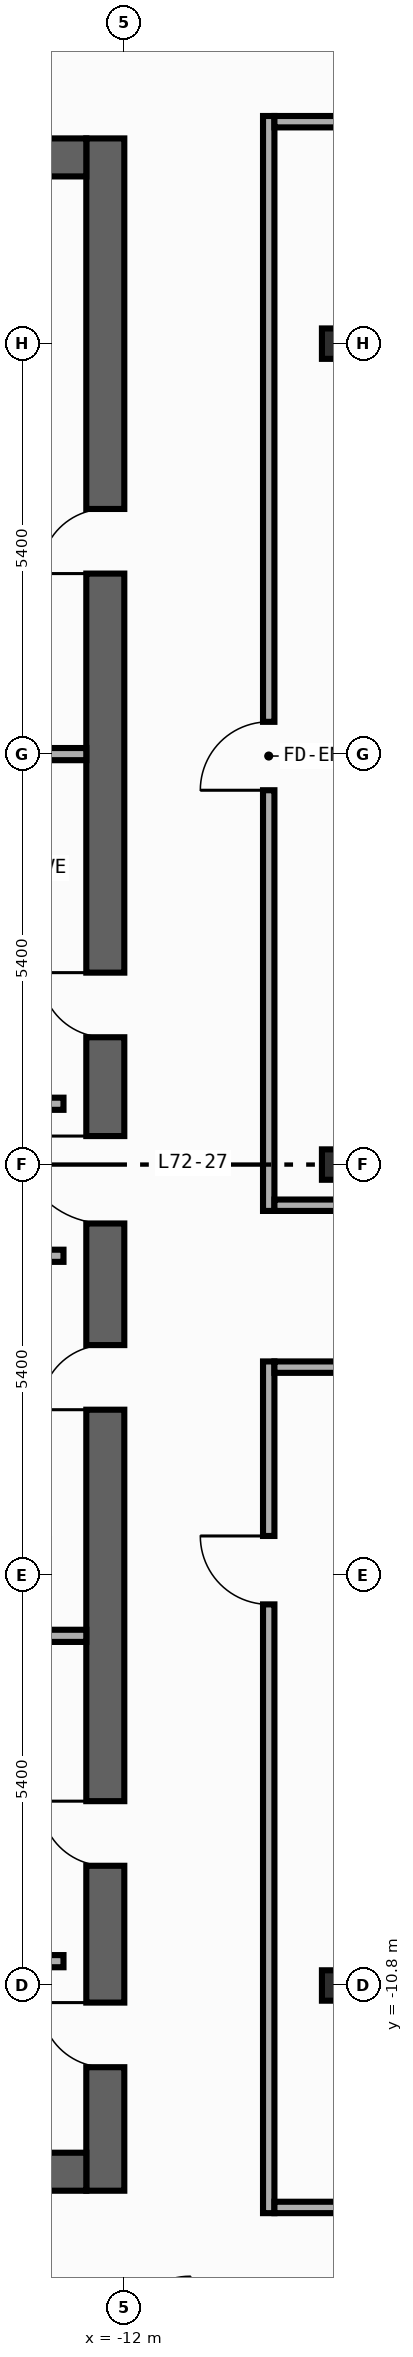
"""IFC4 building model, lengths in metres.
Left out: names, types, materials, properties, quantities, classifications, styles, units other than length and angle.
Written with IfcOpenShell. Run it as: python <this file> out.ifc"""

import sys

from ifc_helpers import new_model, si_unit, direction, frame, frame_2d, origin, origin_2d, place, context, subcontext, project, spatial, rectangle, i_section, extrude, element, fill, save


model = new_model("IFC4")
c1 = context("Model", 3, precision=1e-05, world=origin(), true_north=direction((0.0, 1.0)))
c2 = subcontext(c1, "Body", "Model", "MODEL_VIEW")
j1 = project(units=[si_unit("LENGTHUNIT", "METRE"), si_unit("PLANEANGLEUNIT", "RADIAN")], contexts=[c1])
p1 = place(None, origin())
s1 = spatial("IfcSite", under=j1, at=p1, CompositionType="ELEMENT")
p2 = place(p1, origin())
s2 = spatial("IfcBuilding", under=s1, at=p2, CompositionType="ELEMENT")
p3 = place(p2, frame((0.0, 0.0, 300.4)))
s3 = spatial("IfcBuildingStorey", under=s2, at=p3, CompositionType="ELEMENT", Elevation=300.4)
p4 = place(p3, frame((-12.25, -13.5, 0.0), z_axis=(0.0, 0.0, 1.0), x_axis=(0.0, 1.0, 0.0)))
e1 = element("IfcWall", 1, at=p4, inside=s3, PredefinedType="SHEAR", context=c2, shape_type="SweptSolid", body=[
    extrude(rectangle(XDim=27.0, YDim=0.5, at=frame_2d((13.5, 0.0))), origin(), (0.0, 0.0, 1.0), 3.54),
])
p5 = place(p4, frame((15.175, 0.0, 0.0)))
e2 = element("IfcOpeningElement", 2, at=p5, cuts=e1, PredefinedType="OPENING", context=c2, shape_type="SweptSolid", body=[
    extrude(rectangle(XDim=0.85, YDim=2.1, at=frame_2d((0.425, 1.05))), frame((0.0, 0.26, 0.0), z_axis=(0.0, -1.0, 0.0), x_axis=(1.0, 0.0, 0.0)), (0.0, 0.0, 1.0), 0.52),
])
p6 = place(p4, frame((21.275, 0.0, 0.0)))
e3 = element("IfcOpeningElement", 3, at=p6, cuts=e1, PredefinedType="OPENING", context=c2, shape_type="SweptSolid", body=[
    extrude(rectangle(XDim=0.85, YDim=2.1, at=frame_2d((0.425, 1.05))), frame((0.0, 0.26, 0.0), z_axis=(0.0, -1.0, 0.0), x_axis=(1.0, 0.0, 0.0)), (0.0, 0.0, 1.0), 0.52),
])
p7 = place(p4, frame((4.275, 0.0, 0.0)))
e4 = element("IfcOpeningElement", 4, at=p7, cuts=e1, PredefinedType="OPENING", context=c2, shape_type="SweptSolid", body=[
    extrude(rectangle(XDim=0.85, YDim=2.1, at=frame_2d((0.425, 1.05))), frame((0.0, 0.26, 0.0), z_axis=(0.0, -1.0, 0.0), x_axis=(1.0, 0.0, 0.0)), (0.0, 0.0, 1.0), 0.52),
])
p8 = place(p4, frame((10.275, 0.0, 0.0)))
e5 = element("IfcOpeningElement", 5, at=p8, cuts=e1, PredefinedType="OPENING", context=c2, shape_type="SweptSolid", body=[
    extrude(rectangle(XDim=0.85, YDim=2.1, at=frame_2d((0.425, 1.05))), frame((0.0, 0.26, 0.0), z_axis=(0.0, -1.0, 0.0), x_axis=(1.0, 0.0, 0.0)), (0.0, 0.0, 1.0), 0.52),
])
p9 = place(p4, frame((12.725, 0.0, 0.0)))
e6 = element("IfcOpeningElement", 6, at=p9, cuts=e1, PredefinedType="OPENING", context=c2, shape_type="SweptSolid", body=[
    extrude(rectangle(XDim=1.15, YDim=2.2, at=frame_2d((0.575, 1.1))), frame((0.0, 0.26, 0.0), z_axis=(0.0, -1.0, 0.0), x_axis=(1.0, 0.0, 0.0)), (0.0, 0.0, 1.0), 0.52),
])
p10 = place(p4, frame((1.625, 0.0, 0.0)))
e7 = element("IfcOpeningElement", 7, at=p10, cuts=e1, PredefinedType="OPENING", context=c2, shape_type="SweptSolid", body=[
    extrude(rectangle(XDim=0.85, YDim=2.1, at=frame_2d((0.425, 1.05))), frame((0.0, 0.26, 0.0), z_axis=(0.0, -1.0, 0.0), x_axis=(1.0, 0.0, 0.0)), (0.0, 0.0, 1.0), 0.52),
])
for number, where, z_axis, x_axis in (
    (8, (-19.9, -13.25, 0.0), (0.0, 0.0, 1.0), (1.0, 0.0, 0.0)),
    (9, (-19.9, 13.25, 0.0), (0.0, 0.0, 1.0), (1.0, 0.0, 0.0)),
):
    element("IfcWall", number, at=place(p3, frame(where, z_axis=z_axis, x_axis=x_axis)), inside=s3, PredefinedType="SHEAR", context=c2, shape_type="SweptSolid", body=[
        extrude(rectangle(XDim=7.4, YDim=0.5, at=frame_2d((3.7, 0.0))), origin(), (0.0, 0.0, 1.0), 3.54),
    ])
for number, where, z_axis, x_axis in (
    (10, (-9.2, -10.8, 0.0), (0.0, 0.0, 1.0), (1.0, 0.0, 0.0)),
    (11, (-9.2, 0.0, 0.0), (0.0, 0.0, 1.0), (1.0, 0.0, 0.0)),
    (12, (-9.2, 10.8, 0.0), (0.0, 0.0, 1.0), (1.0, 0.0, 0.0)),
):
    element("IfcColumn", number, at=place(p3, frame(where, z_axis=z_axis, x_axis=x_axis)), inside=s3, PredefinedType="COLUMN", context=c2, shape_type="SweptSolid", body=[
        extrude(i_section(OverallWidth=0.4, OverallDepth=0.4, WebThickness=0.013, FlangeThickness=0.021, FilletRadius=0.022, at=origin_2d()), origin(), (0.0, 0.0, 1.0), 3.8),
    ])
for number, where, z_axis, x_axis in (
    (13, (-15.4, 0.8, 0.0), (0.0, 0.0, 1.0), (1.0, 0.0, 0.0)),
    (14, (-15.4, -1.2, 0.0), (0.0, 0.0, 1.0), (1.0, 0.0, 0.0)),
    (15, (-15.4, -10.48, 0.0), (0.0, 0.0, 1.0), (1.0, 0.0, 0.0)),
):
    element("IfcWall", number, at=place(p3, frame(where, z_axis=z_axis, x_axis=x_axis)), inside=s3, PredefinedType="STANDARD", context=c2, shape_type="SweptSolid", body=[
        extrude(rectangle(XDim=2.6, YDim=0.16, at=frame_2d((1.3, 0.0))), origin(), (0.0, 0.0, 1.0), 3.54),
    ])
for number, where, z_axis, x_axis in (
    (16, (-15.4, 5.4, 0.0), (0.0, 0.0, 1.0), (1.0, 0.0, 0.0)),
    (17, (-15.4, -6.2, 0.0), (0.0, 0.0, 1.0), (1.0, 0.0, 0.0)),
):
    element("IfcWall", number, at=place(p3, frame(where, z_axis=z_axis, x_axis=x_axis)), inside=s3, PredefinedType="PARTITIONING", context=c2, shape_type="SweptSolid", body=[
        extrude(rectangle(XDim=2.9, YDim=0.16, at=frame_2d((1.45, 0.0))), origin(), (0.0, 0.0, 1.0), 3.54),
    ])
p11 = place(p3, frame((-10.1, -0.61, 0.0), z_axis=(0.0, 0.0, 1.0), x_axis=(0.0, 1.0, 0.0)))
e18 = element("IfcWall", 18, at=p11, inside=s3, PredefinedType="PARTITIONING", context=c2, shape_type="SweptSolid", body=[
    extrude(rectangle(XDim=14.405, YDim=0.15, at=frame_2d((7.203, 0.0))), origin(), (0.0, 0.0, 1.0), 3.54),
])
p12 = place(p11, frame((5.535, 0.0, 0.0)))
e19 = element("IfcOpeningElement", 19, at=p12, cuts=e18, PredefinedType="OPENING", context=c2, shape_type="SweptSolid", body=[
    extrude(rectangle(XDim=0.9, YDim=2.15, at=frame_2d((0.45, 1.075))), frame((0.0, 0.085, 0.0), z_axis=(0.0, -1.0, 0.0), x_axis=(1.0, 0.0, 0.0)), (0.0, 0.0, 1.0), 0.17),
])
p13 = place(p3, frame((-10.1, -13.795, 0.0), z_axis=(0.0, 0.0, 1.0), x_axis=(0.0, 1.0, 0.0)))
e20 = element("IfcWall", 20, at=p13, inside=s3, PredefinedType="PARTITIONING", context=c2, shape_type="SweptSolid", body=[
    extrude(rectangle(XDim=11.205, YDim=0.15, at=frame_2d((5.603, 0.0))), origin(), (0.0, 0.0, 1.0), 3.54),
])
p14 = place(p13, frame((8.009, 0.0, 0.0)))
e21 = element("IfcOpeningElement", 21, at=p14, cuts=e20, PredefinedType="OPENING", context=c2, shape_type="SweptSolid", body=[
    extrude(rectangle(XDim=0.9, YDim=2.15, at=frame_2d((0.45, 1.075))), frame((0.0, 0.085, 0.0), z_axis=(0.0, -1.0, 0.0), x_axis=(1.0, 0.0, 0.0)), (0.0, 0.0, 1.0), 0.17),
])
p15 = place(p3, frame((-10.025, -0.535, 0.0), z_axis=(0.0, 0.0, 1.0), x_axis=(1.0, 0.0, 0.0)))
e22 = element("IfcWall", 22, at=p15, inside=s3, PredefinedType="PARTITIONING", context=c2, shape_type="SweptSolid", body=[
    extrude(rectangle(XDim=7.835, YDim=0.15, at=frame_2d((3.917, 0.0))), origin(), (0.0, 0.0, 1.0), 3.54),
])
p16 = place(p15, frame((6.475, 0.0, 0.0)))
e23 = element("IfcOpeningElement", 23, at=p16, cuts=e22, PredefinedType="OPENING", context=c2, shape_type="SweptSolid", body=[
    extrude(rectangle(XDim=0.9, YDim=2.15, at=frame_2d((0.45, 1.075))), frame((0.0, 0.085, 0.0), z_axis=(0.0, -1.0, 0.0), x_axis=(1.0, 0.0, 0.0)), (0.0, 0.0, 1.0), 0.17),
])
p17 = place(p3, frame((-10.025, -2.665, 0.0), z_axis=(0.0, 0.0, 1.0), x_axis=(1.0, 0.0, 0.0)))
e24 = element("IfcWall", 24, at=p17, inside=s3, PredefinedType="PARTITIONING", context=c2, shape_type="SweptSolid", body=[
    extrude(rectangle(XDim=7.855, YDim=0.15, at=frame_2d((3.927, 0.0))), origin(), (0.0, 0.0, 1.0), 3.54),
])
p18 = place(p17, frame((6.495, 0.0, 0.0)))
e25 = element("IfcOpeningElement", 25, at=p18, cuts=e24, PredefinedType="OPENING", context=c2, shape_type="SweptSolid", body=[
    extrude(rectangle(XDim=0.9, YDim=2.15, at=frame_2d((0.45, 1.075))), frame((0.0, 0.085, 0.0), z_axis=(0.0, -1.0, 0.0), x_axis=(1.0, 0.0, 0.0)), (0.0, 0.0, 1.0), 0.17),
])
p19 = place(p3, frame((-10.025, 13.72, 0.0), z_axis=(0.0, 0.0, 1.0), x_axis=(1.0, 0.0, 0.0)))
e26 = element("IfcWall", 26, at=p19, inside=s3, PredefinedType="PARTITIONING", context=c2, shape_type="SweptSolid", body=[
    extrude(rectangle(XDim=7.685, YDim=0.15, at=frame_2d((3.842, 0.0))), origin(), (0.0, 0.0, 1.0), 3.54),
])
p20 = place(p19, frame((6.325, 0.0, 0.0)))
e27 = element("IfcOpeningElement", 27, at=p20, cuts=e26, PredefinedType="OPENING", context=c2, shape_type="SweptSolid", body=[
    extrude(rectangle(XDim=0.9, YDim=2.15, at=frame_2d((0.45, 1.075))), frame((0.0, 0.085, 0.0), z_axis=(0.0, -1.0, 0.0), x_axis=(1.0, 0.0, 0.0)), (0.0, 0.0, 1.0), 0.17),
])
p21 = place(p3, frame((-10.025, -13.72, 0.0), z_axis=(0.0, 0.0, 1.0), x_axis=(1.0, 0.0, 0.0)))
e28 = element("IfcWall", 28, at=p21, inside=s3, PredefinedType="PARTITIONING", context=c2, shape_type="SweptSolid", body=[
    extrude(rectangle(XDim=7.855, YDim=0.15, at=frame_2d((3.927, 0.0))), origin(), (0.0, 0.0, 1.0), 3.54),
])
p22 = place(p21, frame((6.495, 0.0, 0.0)))
e29 = element("IfcOpeningElement", 29, at=p22, cuts=e28, PredefinedType="OPENING", context=c2, shape_type="SweptSolid", body=[
    extrude(rectangle(XDim=0.9, YDim=2.15, at=frame_2d((0.45, 1.075))), frame((0.0, 0.085, 0.0), z_axis=(0.0, -1.0, 0.0), x_axis=(1.0, 0.0, 0.0)), (0.0, 0.0, 1.0), 0.17),
])
p23 = place(p5, origin())
e30 = element("IfcDoor", 30, at=p23, inside=s3, OperationType="SINGLE_SWING_RIGHT", PredefinedType="DOOR", context=c2, shape_type="SweptSolid", body=[
    extrude(rectangle(XDim=0.85, YDim=2.1, at=frame_2d((0.425, 1.05))), frame((0.0, 0.025, 0.0), z_axis=(0.0, -1.0, 0.0), x_axis=(1.0, 0.0, 0.0)), (0.0, 0.0, 1.0), 0.05),
])
fill(e2, e30)
p24 = place(p6, origin())
e31 = element("IfcDoor", 31, at=p24, inside=s3, OperationType="SINGLE_SWING_LEFT", PredefinedType="DOOR", context=c2, shape_type="SweptSolid", body=[
    extrude(rectangle(XDim=0.85, YDim=2.1, at=frame_2d((0.425, 1.05))), frame((0.0, 0.025, 0.0), z_axis=(0.0, -1.0, 0.0), x_axis=(1.0, 0.0, 0.0)), (0.0, 0.0, 1.0), 0.05),
])
fill(e3, e31)
p25 = place(p7, origin())
e32 = element("IfcDoor", 32, at=p25, inside=s3, OperationType="SINGLE_SWING_RIGHT", PredefinedType="DOOR", context=c2, shape_type="SweptSolid", body=[
    extrude(rectangle(XDim=0.85, YDim=2.1, at=frame_2d((0.425, 1.05))), frame((0.0, 0.025, 0.0), z_axis=(0.0, -1.0, 0.0), x_axis=(1.0, 0.0, 0.0)), (0.0, 0.0, 1.0), 0.05),
])
fill(e4, e32)
p26 = place(p8, origin())
e33 = element("IfcDoor", 33, at=p26, inside=s3, OperationType="SINGLE_SWING_LEFT", PredefinedType="DOOR", context=c2, shape_type="SweptSolid", body=[
    extrude(rectangle(XDim=0.85, YDim=2.1, at=frame_2d((0.425, 1.05))), frame((0.0, 0.025, 0.0), z_axis=(0.0, -1.0, 0.0), x_axis=(1.0, 0.0, 0.0)), (0.0, 0.0, 1.0), 0.05),
])
fill(e5, e33)
p27 = place(p9, origin())
e34 = element("IfcDoor", 34, at=p27, inside=s3, OperationType="SINGLE_SWING_RIGHT", PredefinedType="DOOR", context=c2, shape_type="SweptSolid", body=[
    extrude(rectangle(XDim=1.15, YDim=2.2, at=frame_2d((0.575, 1.1))), frame((0.0, 0.025, 0.0), z_axis=(0.0, -1.0, 0.0), x_axis=(1.0, 0.0, 0.0)), (0.0, 0.0, 1.0), 0.05),
])
fill(e6, e34)
p28 = place(p10, origin())
e35 = element("IfcDoor", 35, at=p28, inside=s3, OperationType="SINGLE_SWING_RIGHT", PredefinedType="DOOR", context=c2, shape_type="SweptSolid", body=[
    extrude(rectangle(XDim=0.85, YDim=2.1, at=frame_2d((0.425, 1.05))), frame((0.0, 0.025, 0.0), z_axis=(0.0, -1.0, 0.0), x_axis=(1.0, 0.0, 0.0)), (0.0, 0.0, 1.0), 0.05),
])
fill(e7, e35)
p29 = place(p12, origin())
e36 = element("IfcDoor", 36, at=p29, inside=s3, OperationType="SINGLE_SWING_LEFT", PredefinedType="DOOR", context=c2, shape_type="SweptSolid", body=[
    extrude(rectangle(XDim=0.9, YDim=2.15, at=frame_2d((0.45, 1.075))), frame((0.0, 0.025, 0.0), z_axis=(0.0, -1.0, 0.0), x_axis=(1.0, 0.0, 0.0)), (0.0, 0.0, 1.0), 0.05),
])
fill(e19, e36)
p30 = place(p14, origin())
e37 = element("IfcDoor", 37, at=p30, inside=s3, OperationType="SINGLE_SWING_RIGHT", PredefinedType="DOOR", context=c2, shape_type="SweptSolid", body=[
    extrude(rectangle(XDim=0.9, YDim=2.15, at=frame_2d((0.45, 1.075))), frame((0.0, 0.025, 0.0), z_axis=(0.0, -1.0, 0.0), x_axis=(1.0, 0.0, 0.0)), (0.0, 0.0, 1.0), 0.05),
])
fill(e21, e37)
save(model, sys.argv[1])
